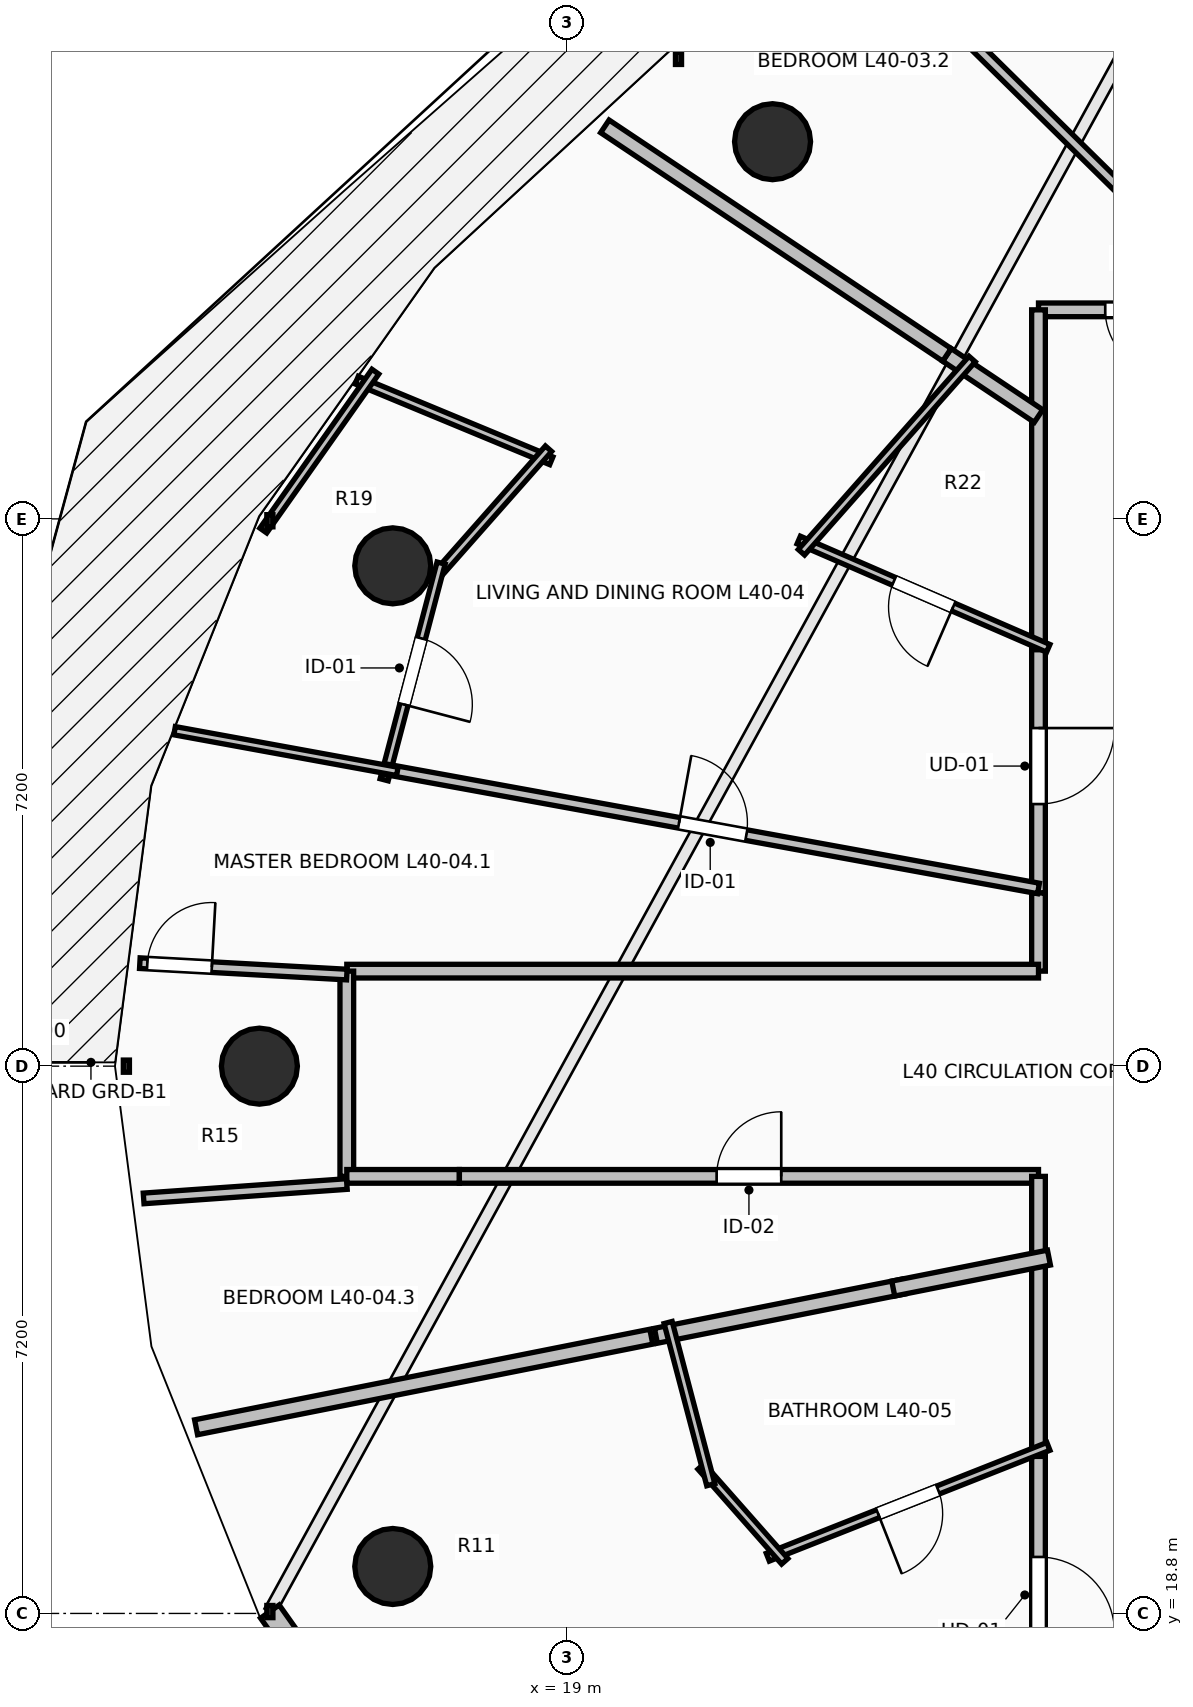
"""IFC4 building model, lengths in metres.
Left out: names, types, materials, properties, quantities, classifications, styles, units other than length and angle.
Written with IfcOpenShell. Run it as: python <this file> out.ifc"""

import sys

from ifc_helpers import new_model, si_unit, direction, frame, frame_2d, origin, origin_2d, place, context, subcontext, project, spatial, rectangle, circle, extrude, element, fill, save


model = new_model("IFC4")
c1 = context("Model", 3, precision=1e-05, world=origin(), true_north=direction((0.0, 1.0)))
c2 = subcontext(c1, "Body", "Model", "MODEL_VIEW")
j1 = project(units=[si_unit("LENGTHUNIT", "METRE"), si_unit("PLANEANGLEUNIT", "RADIAN")], contexts=[c1])
p1 = place(None, origin())
s1 = spatial("IfcSite", under=j1, at=p1, CompositionType="ELEMENT")
p2 = place(p1, origin())
s2 = spatial("IfcBuilding", under=s1, at=p2, CompositionType="ELEMENT")
p3 = place(p2, frame((0.0, 0.0, 150.1)))
s3 = spatial("IfcBuildingStorey", under=s2, at=p3, CompositionType="ELEMENT", Elevation=150.1)
for number, where, z_axis, x_axis in (
    (1, (21.701, 38.162, 0.0), (0.0, 0.0, 1.0), (-0.707, 0.707, 0.0)),
    (2, (16.705, 32.582, 0.0), (0.0, 0.0, 1.0), (-0.924, 0.383, 0.0)),
    (3, (14.95, 26.0, 0.0), (0.0, 0.0, 1.0), (-1.0, 0.0, 0.0)),
    (4, (16.705, 19.418, 0.0), (0.0, 0.0, 1.0), (-0.924, -0.383, 0.0)),
):
    element("IfcColumn", number, at=place(p3, frame(where, z_axis=z_axis, x_axis=x_axis)), inside=s3, PredefinedType="COLUMN", context=c2, shape_type="SweptSolid", body=[
        extrude(circle(Radius=0.5, at=origin_2d()), origin(), (0.0, 0.0, 1.0), 3.5),
    ])
p4 = place(p3, frame((15.088, 18.825, 0.0), z_axis=(0.0, 0.0, 1.0), x_axis=(0.577269753207, -0.816553508371, 0.0)))
e5 = element("IfcWall", 5, at=p4, inside=s3, PredefinedType="STANDARD", context=c2, shape_type="SweptSolid", body=[
    extrude(rectangle(XDim=3.97, YDim=0.3, at=frame_2d((1.985, 0.0))), origin(), (0.0, 0.0, 1.0), 3.24),
])
p5 = place(p3, frame((27.806, 35.95, 0.0), z_axis=(0.0, 0.0, 1.0), x_axis=(-1.0, 0.0, 0.0)))
e6 = element("IfcWall", 6, at=p5, inside=s3, PredefinedType="PARTITIONING", context=c2, shape_type="SweptSolid", body=[
    extrude(rectangle(XDim=2.606, YDim=0.18, at=frame_2d((1.303, 0.0))), origin(), (0.0, 0.0, 1.0), 2.432),
])
p6 = place(p5, frame((0.878, 0.0, 0.0)))
e7 = element("IfcOpeningElement", 7, at=p6, cuts=e6, PredefinedType="OPENING", context=c2, shape_type="SweptSolid", body=[
    extrude(rectangle(XDim=0.85, YDim=2.1, at=frame_2d((0.425, 1.05))), frame((0.0, 0.105, 0.0), z_axis=(0.0, -1.0, 0.0), x_axis=(1.0, 0.0, 0.0)), (0.0, 0.0, 1.0), 0.21),
])
p7 = place(p3, frame((25.2, 35.95, 0.0), z_axis=(0.0, 0.0, 1.0), x_axis=(0.0, -1.0, 0.0)))
e8 = element("IfcWall", 8, at=p7, inside=s3, PredefinedType="PARTITIONING", context=c2, shape_type="SweptSolid", body=[
    extrude(rectangle(XDim=1.457, YDim=0.18, at=frame_2d((0.729, 0.0))), origin(), (0.0, 0.0, 1.0), 2.432),
])
p8 = place(p3, frame((25.2, 31.618, 0.0), z_axis=(0.0, 0.0, 1.0), x_axis=(0.0, -1.0, 0.0)))
e9 = element("IfcWall", 9, at=p8, inside=s3, PredefinedType="PARTITIONING", context=c2, shape_type="SweptSolid", body=[
    extrude(rectangle(XDim=3.34, YDim=0.18, at=frame_2d((1.67, 0.0))), origin(), (0.0, 0.0, 1.0), 2.432),
])
p9 = place(p8, frame((1.17, 0.0, 0.0)))
e10 = element("IfcOpeningElement", 10, at=p9, cuts=e9, PredefinedType="OPENING", context=c2, shape_type="SweptSolid", body=[
    extrude(rectangle(XDim=1.0, YDim=2.15, at=frame_2d((0.5, 1.075))), frame((0.0, 0.105, 0.0), z_axis=(0.0, -1.0, 0.0), x_axis=(1.0, 0.0, 0.0)), (0.0, 0.0, 1.0), 0.21),
])
p10 = place(p3, frame((25.2, 34.633, 0.0), z_axis=(0.0, 0.0, 1.0), x_axis=(0.0, -1.0, 0.0)))
e11 = element("IfcWall", 11, at=p10, inside=s3, PredefinedType="PARTITIONING", context=c2, shape_type="SweptSolid", body=[
    extrude(rectangle(XDim=3.155, YDim=0.18, at=frame_2d((1.578, 0.0))), origin(), (0.0, 0.0, 1.0), 2.432),
])
p11 = place(p3, frame((25.2, 28.278, 0.0), z_axis=(0.0, 0.0, 1.0), x_axis=(0.0, -1.0, 0.0)))
e12 = element("IfcWall", 12, at=p11, inside=s3, PredefinedType="PARTITIONING", context=c2, shape_type="SweptSolid", body=[
    extrude(rectangle(XDim=1.028, YDim=0.18, at=frame_2d((0.514, 0.0))), origin(), (0.0, 0.0, 1.0), 2.432),
])
p12 = place(p3, frame((25.2, 27.25, 0.0), z_axis=(0.0, 0.0, 1.0), x_axis=(-1.0, 0.0, 0.0)))
e13 = element("IfcWall", 13, at=p12, inside=s3, PredefinedType="PARTITIONING", context=c2, shape_type="SweptSolid", body=[
    extrude(rectangle(XDim=9.1, YDim=0.18, at=frame_2d((4.55, 0.0))), origin(), (0.0, 0.0, 1.0), 2.432),
])
p13 = place(p3, frame((16.1, 27.25, 0.0), z_axis=(0.0, 0.0, 1.0), x_axis=(0.0, -1.0, 0.0)))
e14 = element("IfcWall", 14, at=p13, inside=s3, PredefinedType="PARTITIONING", context=c2, shape_type="SweptSolid", body=[
    extrude(rectangle(XDim=2.7, YDim=0.18, at=frame_2d((1.35, 0.0))), origin(), (0.0, 0.0, 1.0), 2.432),
])
p14 = place(p3, frame((16.1, 24.55, 0.0), z_axis=(0.0, 0.0, 1.0), x_axis=(1.0, 0.0, 0.0)))
e15 = element("IfcWall", 15, at=p14, inside=s3, PredefinedType="PARTITIONING", context=c2, shape_type="SweptSolid", body=[
    extrude(rectangle(XDim=1.481, YDim=0.18, at=frame_2d((0.74, 0.0))), origin(), (0.0, 0.0, 1.0), 3.24),
])
p15 = place(p3, frame((17.581, 24.55, 0.0), z_axis=(0.0, 0.0, 1.0), x_axis=(1.0, 0.0, 0.0)))
e16 = element("IfcWall", 16, at=p15, inside=s3, PredefinedType="PARTITIONING", context=c2, shape_type="SweptSolid", body=[
    extrude(rectangle(XDim=7.619, YDim=0.18, at=frame_2d((3.81, 0.0))), origin(), (0.0, 0.0, 1.0), 2.886),
])
p16 = place(p15, frame((3.385, 0.0, 0.0)))
e17 = element("IfcOpeningElement", 17, at=p16, cuts=e16, PredefinedType="OPENING", context=c2, shape_type="SweptSolid", body=[
    extrude(rectangle(XDim=0.85, YDim=2.1, at=frame_2d((0.425, 1.05))), frame((0.0, 0.105, 0.0), z_axis=(0.0, -1.0, 0.0), x_axis=(1.0, 0.0, 0.0)), (0.0, 0.0, 1.0), 0.21),
])
p17 = place(p3, frame((25.2, 24.55, 0.0), z_axis=(0.0, 0.0, 1.0), x_axis=(0.0, -1.0, 0.0)))
e18 = element("IfcWall", 18, at=p17, inside=s3, PredefinedType="PARTITIONING", context=c2, shape_type="SweptSolid", body=[
    extrude(rectangle(XDim=1.157, YDim=0.18, at=frame_2d((0.579, 0.0))), origin(), (0.0, 0.0, 1.0), 3.24),
])
p18 = place(p3, frame((25.2, 21.006, 0.0), z_axis=(0.0, 0.0, 1.0), x_axis=(0.0, -1.0, 0.0)))
e19 = element("IfcWall", 19, at=p18, inside=s3, PredefinedType="PARTITIONING", context=c2, shape_type="SweptSolid", body=[
    extrude(rectangle(XDim=3.926, YDim=0.18, at=frame_2d((1.963, 0.0))), origin(), (0.0, 0.0, 1.0), 2.432),
])
p19 = place(p18, frame((1.463, 0.0, 0.0)))
e20 = element("IfcOpeningElement", 20, at=p19, cuts=e19, PredefinedType="OPENING", context=c2, shape_type="SweptSolid", body=[
    extrude(rectangle(XDim=1.0, YDim=2.15, at=frame_2d((0.5, 1.075))), frame((0.0, 0.105, 0.0), z_axis=(0.0, -1.0, 0.0), x_axis=(1.0, 0.0, 0.0)), (0.0, 0.0, 1.0), 0.21),
])
p20 = place(p3, frame((25.2, 23.533, 0.0), z_axis=(0.0, 0.0, 1.0), x_axis=(0.0, -1.0, 0.0)))
e21 = element("IfcWall", 21, at=p20, inside=s3, PredefinedType="PARTITIONING", context=c2, shape_type="SweptSolid", body=[
    extrude(rectangle(XDim=2.667, YDim=0.18, at=frame_2d((1.333, 0.0))), origin(), (0.0, 0.0, 1.0), 3.24),
])
p21 = place(p3, frame((22.96, 40.806, 0.0), z_axis=(0.0, 0.0, 1.0), x_axis=(0.712587980465, -0.70158276069, 0.0)))
e22 = element("IfcWall", 22, at=p21, inside=s3, PredefinedType="PARTITIONING", context=c2, shape_type="SweptSolid", body=[
    extrude(rectangle(XDim=6.921, YDim=0.14, at=frame_2d((3.461, 0.0))), origin(), (0.0, 0.0, 1.0), 2.432),
])
p22 = place(p3, frame((23.995, 35.358, 0.0), z_axis=(0.0, 0.0, 1.0), x_axis=(0.831505536539, -0.555516464837, 0.0)))
e23 = element("IfcWall", 23, at=p22, inside=s3, PredefinedType="PARTITIONING", context=c2, shape_type="SweptSolid", body=[
    extrude(rectangle(XDim=1.449, YDim=0.2, at=frame_2d((0.725, 0.0))), origin(), (0.0, 0.0, 1.0), 3.24),
])
p23 = place(p3, frame((19.495, 38.364, 0.0), z_axis=(0.0, 0.0, 1.0), x_axis=(0.831529389247, -0.55548076008, 0.0)))
e24 = element("IfcWall", 24, at=p23, inside=s3, PredefinedType="PARTITIONING", context=c2, shape_type="SweptSolid", body=[
    extrude(rectangle(XDim=5.412, YDim=0.2, at=frame_2d((2.706, 0.0))), origin(), (0.0, 0.0, 1.0), 2.728),
])
p24 = place(p3, frame((25.328, 31.497, 0.0), z_axis=(0.0, 0.0, 1.0), x_axis=(-0.917371334891, 0.398032453351, 0.0)))
e25 = element("IfcWall", 25, at=p24, inside=s3, PredefinedType="PARTITIONING", context=c2, shape_type="SweptSolid", body=[
    extrude(rectangle(XDim=3.578, YDim=0.11, at=frame_2d((1.789, 0.0))), origin(), (0.0, 0.0, 1.0), 2.886),
])
p25 = place(p24, frame((1.364, 0.0, 0.0)))
e26 = element("IfcOpeningElement", 26, at=p25, cuts=e25, PredefinedType="OPENING", context=c2, shape_type="SweptSolid", body=[
    extrude(rectangle(XDim=0.85, YDim=2.1, at=frame_2d((0.425, 1.05))), frame((0.0, 0.07, 0.0), z_axis=(0.0, -1.0, 0.0), x_axis=(1.0, 0.0, 0.0)), (0.0, 0.0, 1.0), 0.14),
])
p26 = place(p3, frame((22.081, 32.761, 0.0), z_axis=(0.0, 0.0, 1.0), x_axis=(0.662023888113, 0.749482736004, 0.0)))
e27 = element("IfcWall", 27, at=p26, inside=s3, PredefinedType="PARTITIONING", context=c2, shape_type="SweptSolid", body=[
    extrude(rectangle(XDim=3.392, YDim=0.11, at=frame_2d((1.696, 0.0))), origin(), (0.0, 0.0, 1.0), 3.24),
])
p27 = place(p3, frame((16.231, 35.026, 0.0), z_axis=(0.0, 0.0, 1.0), x_axis=(0.923742873908, -0.383013188943, 0.0)))
e28 = element("IfcWall", 28, at=p27, inside=s3, PredefinedType="PARTITIONING", context=c2, shape_type="SweptSolid", body=[
    extrude(rectangle(XDim=2.771, YDim=0.11, at=frame_2d((1.385, 0.0))), origin(), (0.0, 0.0, 1.0), 2.728),
])
p28 = place(p3, frame((18.754, 34.123, 0.0), z_axis=(0.0, 0.0, 1.0), x_axis=(-0.66207590595, -0.749436785033, 0.0)))
e29 = element("IfcWall", 29, at=p28, inside=s3, PredefinedType="PARTITIONING", context=c2, shape_type="SweptSolid", body=[
    extrude(rectangle(XDim=2.328, YDim=0.11, at=frame_2d((1.164, 0.0))), origin(), (0.0, 0.0, 1.0), 2.432),
])
p29 = place(p3, frame((17.341, 32.618, 0.0), z_axis=(0.0, 0.0, 1.0), x_axis=(-0.254191595923, -0.967153882566, 0.0)))
e30 = element("IfcWall", 30, at=p29, inside=s3, PredefinedType="PARTITIONING", context=c2, shape_type="SweptSolid", body=[
    extrude(rectangle(XDim=2.948, YDim=0.11, at=frame_2d((1.474, 0.0))), origin(), (0.0, 0.0, 1.0), 2.432),
])
p30 = place(p29, frame((1.024, 0.0, 0.0)))
e31 = element("IfcOpeningElement", 31, at=p30, cuts=e30, PredefinedType="OPENING", context=c2, shape_type="SweptSolid", body=[
    extrude(rectangle(XDim=0.9, YDim=2.1, at=frame_2d((0.45, 1.05))), frame((0.0, 0.07, 0.0), z_axis=(0.0, -1.0, 0.0), x_axis=(1.0, 0.0, 0.0)), (0.0, 0.0, 1.0), 0.14),
])
p31 = place(p3, frame((16.476, 35.136, 0.0), z_axis=(0.0, 0.0, 1.0), x_axis=(-0.576469555269, -0.81711862777, 0.0)))
e32 = element("IfcWall", 32, at=p31, inside=s3, PredefinedType="PARTITIONING", context=c2, shape_type="SweptSolid", body=[
    extrude(rectangle(XDim=2.558, YDim=0.11, at=frame_2d((1.279, 0.0))), origin(), (0.0, 0.0, 1.0), 3.24),
])
p32 = place(p3, frame((16.627, 29.903, 0.0), z_axis=(0.0, 0.0, 1.0), x_axis=(0.983739211704, -0.179602793286, 0.0)))
e33 = element("IfcWall", 33, at=p32, inside=s3, PredefinedType="PARTITIONING", context=c2, shape_type="SweptSolid", body=[
    extrude(rectangle(XDim=8.715, YDim=0.14, at=frame_2d((4.357, 0.0))), origin(), (0.0, 0.0, 1.0), 2.886),
])
p33 = place(p32, frame((3.907, 0.0, 0.0)))
e34 = element("IfcOpeningElement", 34, at=p33, cuts=e33, PredefinedType="OPENING", context=c2, shape_type="SweptSolid", body=[
    extrude(rectangle(XDim=0.9, YDim=2.1, at=frame_2d((0.45, 1.05))), frame((0.0, 0.085, 0.0), z_axis=(0.0, -1.0, 0.0), x_axis=(1.0, 0.0, 0.0)), (0.0, 0.0, 1.0), 0.17),
])
p34 = place(p3, frame((13.834, 30.413, 0.0), z_axis=(0.0, 0.0, 1.0), x_axis=(0.983716126889, -0.179729189891, 0.0)))
e35 = element("IfcWall", 35, at=p34, inside=s3, PredefinedType="PARTITIONING", context=c2, shape_type="SweptSolid", body=[
    extrude(rectangle(XDim=2.979, YDim=0.11, at=frame_2d((1.49, 0.0))), origin(), (0.0, 0.0, 1.0), 2.728),
])
p35 = place(p3, frame((13.377, 27.355, 0.0), z_axis=(0.0, 0.0, 1.0), x_axis=(0.998488320145, -0.054964302364, 0.0)))
e36 = element("IfcWall", 36, at=p35, inside=s3, PredefinedType="PARTITIONING", context=c2, shape_type="SweptSolid", body=[
    extrude(rectangle(XDim=2.727, YDim=0.14, at=frame_2d((1.364, 0.0))), origin(), (0.0, 0.0, 1.0), 2.728),
])
p36 = place(p35, frame((0.099, 0.0, 0.0)))
e37 = element("IfcOpeningElement", 37, at=p36, cuts=e36, PredefinedType="OPENING", context=c2, shape_type="SweptSolid", body=[
    extrude(rectangle(XDim=0.85, YDim=2.1, at=frame_2d((0.425, 1.05))), frame((0.0, 0.085, 0.0), z_axis=(0.0, -1.0, 0.0), x_axis=(1.0, 0.0, 0.0)), (0.0, 0.0, 1.0), 0.17),
])
p37 = place(p3, frame((13.427, 24.26, 0.0), z_axis=(0.0, 0.0, 1.0), x_axis=(0.997504277417, 0.070606065851, 0.0)))
e38 = element("IfcWall", 38, at=p37, inside=s3, PredefinedType="PARTITIONING", context=c2, shape_type="SweptSolid", body=[
    extrude(rectangle(XDim=2.68, YDim=0.14, at=frame_2d((1.34, 0.0))), origin(), (0.0, 0.0, 1.0), 2.728),
])
p38 = place(p3, frame((14.117, 21.249, 0.0), z_axis=(0.0, 0.0, 1.0), x_axis=(0.980766298352, 0.19518572698, 0.0)))
e39 = element("IfcWall", 39, at=p38, inside=s3, PredefinedType="PARTITIONING", context=c2, shape_type="SweptSolid", body=[
    extrude(rectangle(XDim=6.106, YDim=0.2, at=frame_2d((3.053, 0.0))), origin(), (0.0, 0.0, 1.0), 2.728),
])
p39 = place(p3, frame((20.167, 22.453, 0.0), z_axis=(0.0, 0.0, 1.0), x_axis=(0.980766708229, 0.195183667423, 0.0)))
e40 = element("IfcWall", 40, at=p39, inside=s3, PredefinedType="PARTITIONING", context=c2, shape_type="SweptSolid", body=[
    extrude(rectangle(XDim=3.323, YDim=0.2, at=frame_2d((1.662, 0.0))), origin(), (0.0, 0.0, 1.0), 2.972),
])
p40 = place(p3, frame((23.289, 23.074, 0.0), z_axis=(0.0, 0.0, 1.0), x_axis=(0.980804842296, 0.194991951961, 0.0)))
e41 = element("IfcWall", 41, at=p40, inside=s3, PredefinedType="PARTITIONING", context=c2, shape_type="SweptSolid", body=[
    extrude(rectangle(XDim=2.088, YDim=0.2, at=frame_2d((1.044, 0.0))), origin(), (0.0, 0.0, 1.0), 2.886),
])
p41 = place(p3, frame((25.33, 20.997, 0.0), z_axis=(0.0, 0.0, 1.0), x_axis=(-0.930092731386, -0.367324803169, 0.0)))
e42 = element("IfcWall", 42, at=p41, inside=s3, PredefinedType="PARTITIONING", context=c2, shape_type="SweptSolid", body=[
    extrude(rectangle(XDim=3.969, YDim=0.11, at=frame_2d((1.984, 0.0))), origin(), (0.0, 0.0, 1.0), 2.886),
])
p42 = place(p41, frame((1.559, 0.0, 0.0)))
e43 = element("IfcOpeningElement", 43, at=p42, cuts=e42, PredefinedType="OPENING", context=c2, shape_type="SweptSolid", body=[
    extrude(rectangle(XDim=0.85, YDim=2.1, at=frame_2d((0.425, 1.05))), frame((0.0, 0.07, 0.0), z_axis=(0.0, -1.0, 0.0), x_axis=(1.0, 0.0, 0.0)), (0.0, 0.0, 1.0), 0.14),
])
p43 = place(p3, frame((21.862, 19.486, 0.0), z_axis=(0.0, 0.0, 1.0), x_axis=(-0.661645897528, 0.749816448396, 0.0)))
e44 = element("IfcWall", 44, at=p43, inside=s3, PredefinedType="PARTITIONING", context=c2, shape_type="SweptSolid", body=[
    extrude(rectangle(XDim=1.664, YDim=0.11, at=frame_2d((0.832, 0.0))), origin(), (0.0, 0.0, 1.0), 3.24),
])
p44 = place(p3, frame((20.889, 20.494, 0.0), z_axis=(0.0, 0.0, 1.0), x_axis=(-0.254389812051, 0.967101764823, 0.0)))
e45 = element("IfcWall", 45, at=p44, inside=s3, PredefinedType="PARTITIONING", context=c2, shape_type="SweptSolid", body=[
    extrude(rectangle(XDim=2.206, YDim=0.11, at=frame_2d((1.103, 0.0))), origin(), (0.0, 0.0, 1.0), 3.24),
])
p45 = place(p9, origin())
e46 = element("IfcDoor", 46, at=p45, inside=s3, OperationType="SINGLE_SWING_LEFT", PredefinedType="DOOR", context=c2, shape_type="SweptSolid", body=[
    extrude(rectangle(XDim=1.0, YDim=2.15, at=frame_2d((0.5, 1.075))), frame((0.0, 0.025, 0.0), z_axis=(0.0, -1.0, 0.0), x_axis=(1.0, 0.0, 0.0)), (0.0, 0.0, 1.0), 0.05),
])
fill(e10, e46)
p46 = place(p19, origin())
e47 = element("IfcDoor", 47, at=p46, inside=s3, OperationType="SINGLE_SWING_RIGHT", PredefinedType="DOOR", context=c2, shape_type="SweptSolid", body=[
    extrude(rectangle(XDim=1.0, YDim=2.15, at=frame_2d((0.5, 1.075))), frame((0.0, 0.025, 0.0), z_axis=(0.0, -1.0, 0.0), x_axis=(1.0, 0.0, 0.0)), (0.0, 0.0, 1.0), 0.05),
])
fill(e20, e47)
p47 = place(p25, origin())
e48 = element("IfcDoor", 48, at=p47, inside=s3, OperationType="SINGLE_SWING_LEFT", PredefinedType="DOOR", context=c2, shape_type="SweptSolid", body=[
    extrude(rectangle(XDim=0.85, YDim=2.1, at=frame_2d((0.425, 1.05))), frame((0.0, 0.025, 0.0), z_axis=(0.0, -1.0, 0.0), x_axis=(1.0, 0.0, 0.0)), (0.0, 0.0, 1.0), 0.05),
])
fill(e26, e48)
p48 = place(p30, origin())
e49 = element("IfcDoor", 49, at=p48, inside=s3, OperationType="SINGLE_SWING_RIGHT", PredefinedType="DOOR", context=c2, shape_type="SweptSolid", body=[
    extrude(rectangle(XDim=0.9, YDim=2.1, at=frame_2d((0.45, 1.05))), frame((0.0, 0.025, 0.0), z_axis=(0.0, -1.0, 0.0), x_axis=(1.0, 0.0, 0.0)), (0.0, 0.0, 1.0), 0.05),
])
fill(e31, e49)
p49 = place(p33, origin())
e50 = element("IfcDoor", 50, at=p49, inside=s3, OperationType="SINGLE_SWING_LEFT", PredefinedType="DOOR", context=c2, shape_type="SweptSolid", body=[
    extrude(rectangle(XDim=0.9, YDim=2.1, at=frame_2d((0.45, 1.05))), frame((0.0, 0.025, 0.0), z_axis=(0.0, -1.0, 0.0), x_axis=(1.0, 0.0, 0.0)), (0.0, 0.0, 1.0), 0.05),
])
fill(e34, e50)
p50 = place(p42, origin())
e51 = element("IfcDoor", 51, at=p50, inside=s3, OperationType="SINGLE_SWING_RIGHT", PredefinedType="DOOR", context=c2, shape_type="SweptSolid", body=[
    extrude(rectangle(XDim=0.85, YDim=2.1, at=frame_2d((0.425, 1.05))), frame((0.0, 0.025, 0.0), z_axis=(0.0, -1.0, 0.0), x_axis=(1.0, 0.0, 0.0)), (0.0, 0.0, 1.0), 0.05),
])
fill(e43, e51)
p51 = place(p6, origin())
e52 = element("IfcDoor", 52, at=p51, inside=s3, OperationType="SINGLE_SWING_LEFT", PredefinedType="DOOR", context=c2, shape_type="SweptSolid", body=[
    extrude(rectangle(XDim=0.85, YDim=2.1, at=frame_2d((0.425, 1.05))), frame((0.0, 0.025, 0.0), z_axis=(0.0, -1.0, 0.0), x_axis=(1.0, 0.0, 0.0)), (0.0, 0.0, 1.0), 0.05),
])
fill(e7, e52)
p52 = place(p16, origin())
e53 = element("IfcDoor", 53, at=p52, inside=s3, OperationType="SINGLE_SWING_RIGHT", PredefinedType="DOOR", context=c2, shape_type="SweptSolid", body=[
    extrude(rectangle(XDim=0.85, YDim=2.1, at=frame_2d((0.425, 1.05))), frame((0.0, 0.025, 0.0), z_axis=(0.0, -1.0, 0.0), x_axis=(1.0, 0.0, 0.0)), (0.0, 0.0, 1.0), 0.05),
])
fill(e17, e53)
p53 = place(p36, origin())
e54 = element("IfcDoor", 54, at=p53, inside=s3, OperationType="SINGLE_SWING_RIGHT", PredefinedType="DOOR", context=c2, shape_type="SweptSolid", body=[
    extrude(rectangle(XDim=0.85, YDim=2.1, at=frame_2d((0.425, 1.05))), frame((0.0, 0.025, 0.0), z_axis=(0.0, -1.0, 0.0), x_axis=(1.0, 0.0, 0.0)), (0.0, 0.0, 1.0), 0.05),
])
fill(e37, e54)
save(model, sys.argv[1])
